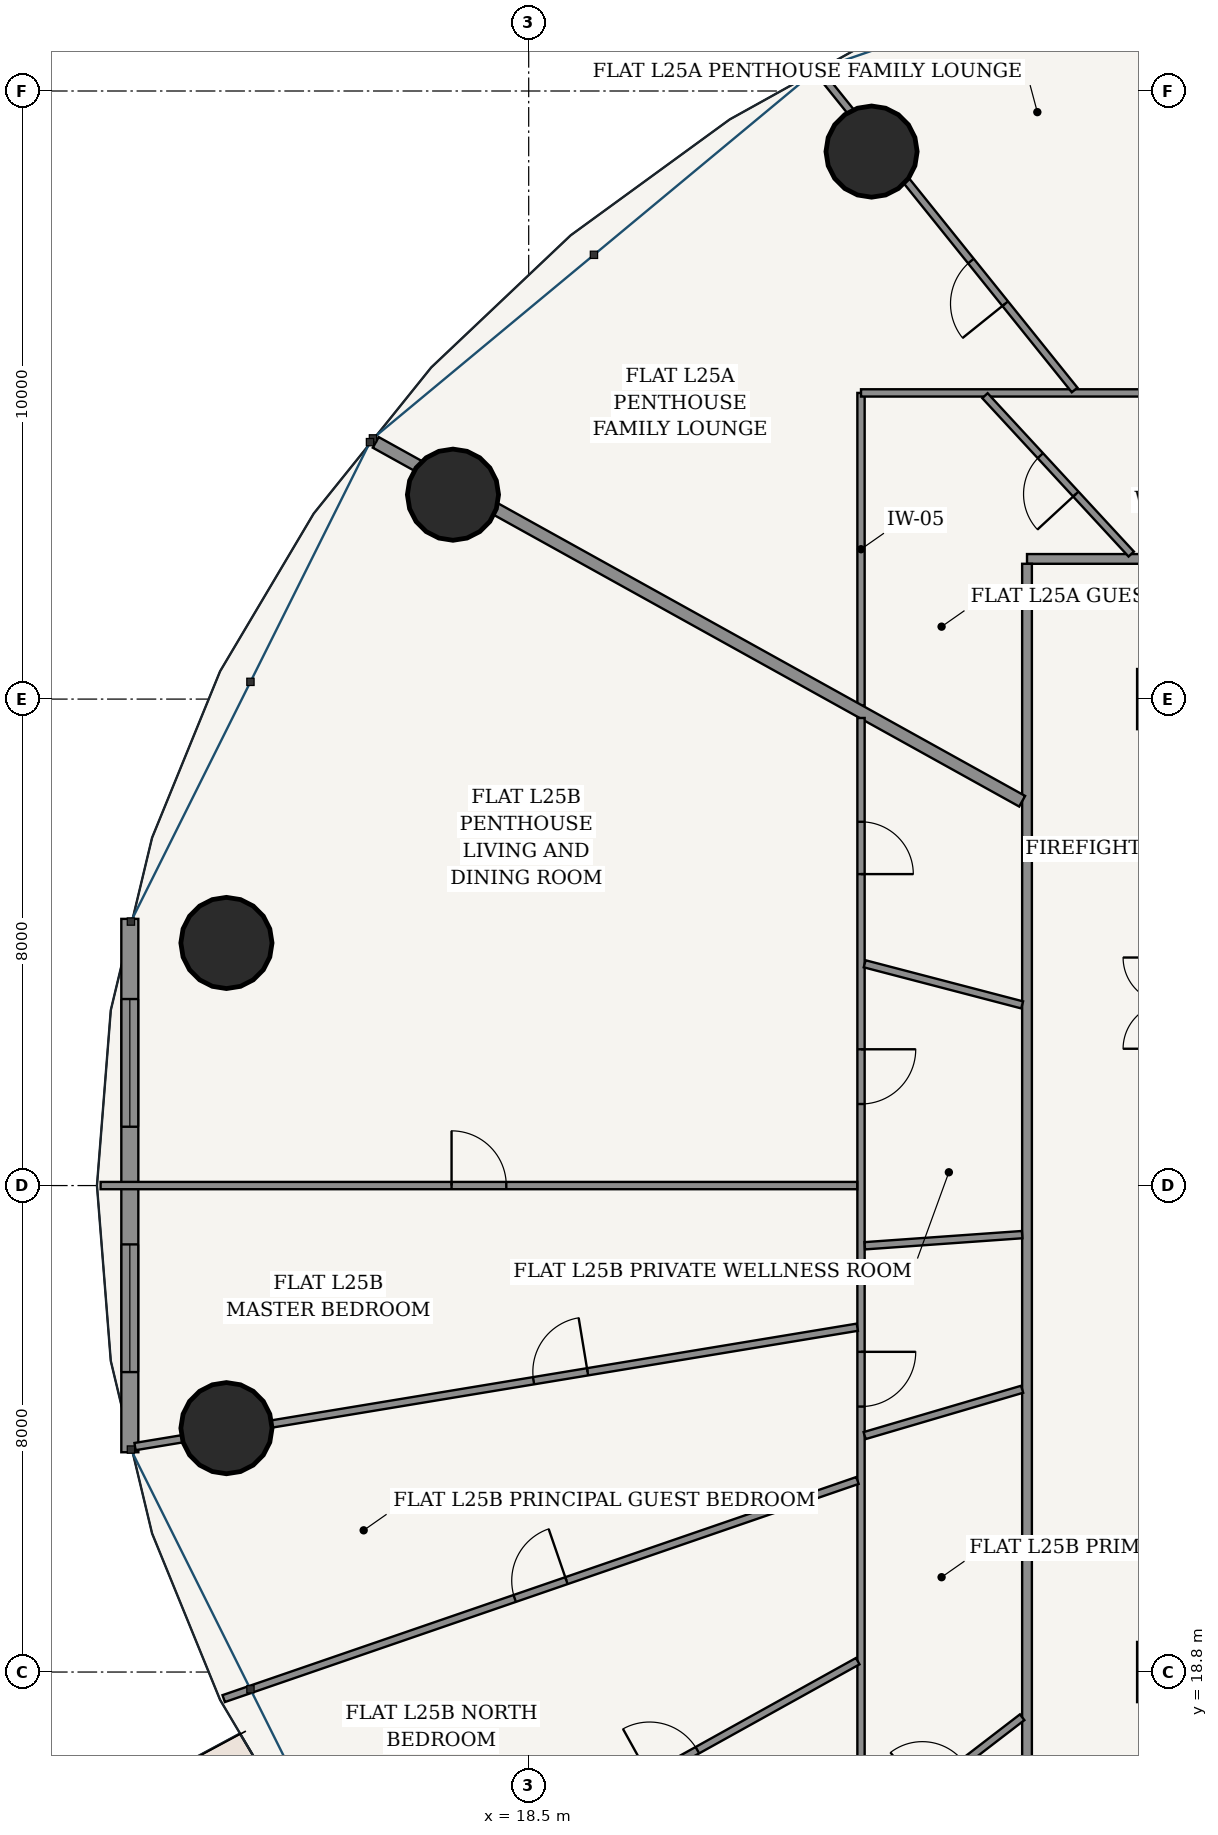
"""IFC4 building model, lengths in metres.
Left out: names, types, materials, properties, quantities, classifications, styles, units other than length and angle.
Written with IfcOpenShell. Run it as: python <this file> out.ifc"""

import sys

from ifc_helpers import new_model, si_unit, direction, frame, frame_2d, origin, origin_2d, place, context, subcontext, project, spatial, rectangle, hollow_circle, extrude, source, transform, mapped, element, fill, save


model = new_model("IFC4")
c1 = context("Model", 3, precision=1e-05, world=origin(), true_north=direction((-0.2419218956, 0.970295726276)))
c2 = subcontext(c1, "Body", "Model", "MODEL_VIEW")
j1 = project(units=[si_unit("LENGTHUNIT", "METRE"), si_unit("PLANEANGLEUNIT", "RADIAN")], contexts=[c1])
p1 = place(None, origin())
s1 = spatial("IfcSite", under=j1, at=p1, CompositionType="ELEMENT")
p2 = place(p1, origin())
s2 = spatial("IfcBuilding", under=s1, at=p2, CompositionType="ELEMENT")
p3 = place(p2, frame((0.0, 0.0, 97.8)))
s3 = spatial("IfcBuildingStorey", under=s2, at=p3, CompositionType="ELEMENT", Elevation=97.8)
for number, where, z_axis, x_axis in (
    (1, (24.138, 43.803, 0.0), (0.0, 0.0, 1.0), (1.0, 0.0, 0.0)),
    (2, (17.255, 38.161, 0.0), (0.0, 0.0, 1.0), (1.0, 0.0, 0.0)),
    (3, (13.529, 30.79, 0.0), (0.0, 0.0, 1.0), (1.0, 0.0, 0.0)),
    (4, (13.529, 22.81, 0.0), (0.0, 0.0, 1.0), (1.0, 0.0, 0.0)),
):
    element("IfcColumn", number, at=place(p3, frame(where, z_axis=z_axis, x_axis=x_axis)), inside=s3, PredefinedType="COLUMN", context=c2, shape_type="SweptSolid", body=[
        extrude(hollow_circle(Radius=0.75, WallThickness=0.045, at=origin_2d()), origin(), (0.0, 0.0, 1.0), 3.6),
    ])
p4 = place(p3, frame((11.94, 31.186, 0.0), z_axis=(0.0, 0.0, 1.0), x_axis=(0.0, -1.0, 0.0)))
e5 = element("IfcWall", 5, at=p4, inside=s3, PredefinedType="SOLIDWALL", context=c2, shape_type="SweptSolid", body=[
    extrude(rectangle(XDim=8.771, YDim=0.28, at=frame_2d((4.386, 0.0))), origin(), (0.0, 0.0, 1.0), 3.325),
])
p5 = place(p4, frame((1.318, 0.0, 0.85)))
e6 = element("IfcOpeningElement", 6, at=p5, cuts=e5, PredefinedType="OPENING", context=c2, shape_type="SweptSolid", body=[
    extrude(rectangle(XDim=2.1, YDim=1.95, at=frame_2d((1.05, 0.975))), frame((0.0, 0.15, 0.0), z_axis=(0.0, -1.0, 0.0), x_axis=(1.0, 0.0, 0.0)), (0.0, 0.0, 1.0), 0.3),
])
p6 = place(p4, frame((5.353, 0.0, 0.85)))
e7 = element("IfcOpeningElement", 7, at=p6, cuts=e5, PredefinedType="OPENING", context=c2, shape_type="SweptSolid", body=[
    extrude(rectangle(XDim=2.1, YDim=1.95, at=frame_2d((1.05, 0.975))), frame((0.0, 0.15, 0.0), z_axis=(0.0, -1.0, 0.0), x_axis=(1.0, 0.0, 0.0)), (0.0, 0.0, 1.0), 0.3),
])
p7 = place(p3, frame((26.695, 37.105, 0.0), z_axis=(0.0, 0.0, 1.0), x_axis=(1.0, 0.0, 0.0)))
e8 = element("IfcWall", 8, at=p7, inside=s3, PredefinedType="PARTITIONING", context=c2, shape_type="SweptSolid", body=[
    extrude(rectangle(XDim=22.61, YDim=0.16, at=frame_2d((11.305, 0.0))), origin(), (0.0, 0.0, 1.0), 2.767),
])
p8 = place(p7, frame((18.058, 0.0, 0.0)))
e9 = element("IfcOpeningElement", 9, at=p8, cuts=e8, PredefinedType="OPENING", context=c2, shape_type="SweptSolid", body=[
    extrude(rectangle(XDim=0.98, YDim=2.2, at=frame_2d((0.49, 1.1))), frame((0.0, 0.09, 0.0), z_axis=(0.0, -1.0, 0.0), x_axis=(1.0, 0.0, 0.0)), (0.0, 0.0, 1.0), 0.18),
])
p9 = place(p3, frame((26.695, 16.575, 0.0), z_axis=(0.0, 0.0, 1.0), x_axis=(0.0, 1.0, 0.0)))
e10 = element("IfcWall", 10, at=p9, inside=s3, PredefinedType="PARTITIONING", context=c2, shape_type="SweptSolid", body=[
    extrude(rectangle(XDim=20.45, YDim=0.16, at=frame_2d((10.225, 0.0))), origin(), (0.0, 0.0, 1.0), 2.767),
])
p10 = place(p3, frame((23.965, 34.693, 0.0), z_axis=(0.0, 0.0, 1.0), x_axis=(0.0, 1.0, 0.0)))
e11 = element("IfcWall", 11, at=p10, inside=s3, PredefinedType="PARTITIONING", context=c2, shape_type="SweptSolid", body=[
    extrude(rectangle(XDim=5.142, YDim=0.12, at=frame_2d((2.571, 0.0))), origin(), (0.0, 0.0, 1.0), 3.004),
])
p11 = place(p3, frame((23.965, 39.835, 0.0), z_axis=(0.0, 0.0, 1.0), x_axis=(1.0, 0.0, 0.0)))
e12 = element("IfcWall", 12, at=p11, inside=s3, PredefinedType="PARTITIONING", context=c2, shape_type="SweptSolid", body=[
    extrude(rectangle(XDim=28.07, YDim=0.12, at=frame_2d((14.035, 0.0))), origin(), (0.0, 0.0, 1.0), 2.767),
])
p12 = place(p11, frame((23.442, 0.0, 0.0)))
e13 = element("IfcOpeningElement", 13, at=p12, cuts=e12, PredefinedType="OPENING", context=c2, shape_type="SweptSolid", body=[
    extrude(rectangle(XDim=0.9, YDim=2.15, at=frame_2d((0.45, 1.075))), frame((0.0, 0.07, 0.0), z_axis=(0.0, -1.0, 0.0), x_axis=(1.0, 0.0, 0.0)), (0.0, 0.0, 1.0), 0.14),
])
p13 = place(p3, frame((31.474, 39.89, 0.0), z_axis=(0.0, 0.0, 1.0), x_axis=(-0.446167584581, 0.894949432353, 0.0)))
e14 = element("IfcWall", 14, at=p13, inside=s3, PredefinedType="PARTITIONING", context=c2, shape_type="SweptSolid", body=[
    extrude(rectangle(XDim=8.125, YDim=0.12, at=frame_2d((4.062, 0.0))), origin(), (0.0, 0.0, 1.0), 2.767),
])
p14 = place(p13, frame((3.612, 0.0, 0.0)))
e15 = element("IfcOpeningElement", 15, at=p14, cuts=e14, PredefinedType="OPENING", context=c2, shape_type="SweptSolid", body=[
    extrude(rectangle(XDim=0.9, YDim=2.15, at=frame_2d((0.45, 1.075))), frame((0.0, 0.07, 0.0), z_axis=(0.0, -1.0, 0.0), x_axis=(1.0, 0.0, 0.0)), (0.0, 0.0, 1.0), 0.14),
])
p15 = place(p3, frame((27.478, 39.883, 0.0), z_axis=(0.0, 0.0, 1.0), x_axis=(-0.62672583251, 0.779239841682, 0.0)))
e16 = element("IfcWall", 16, at=p15, inside=s3, PredefinedType="PARTITIONING", context=c2, shape_type="SweptSolid", body=[
    extrude(rectangle(XDim=6.678, YDim=0.12, at=frame_2d((3.339, 0.0))), origin(), (0.0, 0.0, 1.0), 2.767),
])
p16 = place(p15, frame((1.821, 0.0, 0.0)))
e17 = element("IfcOpeningElement", 17, at=p16, cuts=e16, PredefinedType="OPENING", context=c2, shape_type="SweptSolid", body=[
    extrude(rectangle(XDim=0.9, YDim=2.15, at=frame_2d((0.45, 1.075))), frame((0.0, 0.07, 0.0), z_axis=(0.0, -1.0, 0.0), x_axis=(1.0, 0.0, 0.0)), (0.0, 0.0, 1.0), 0.14),
])
p17 = place(p3, frame((28.409, 37.185, 0.0), z_axis=(0.0, 0.0, 1.0), x_axis=(-0.678451695105, 0.734645014554, 0.0)))
e18 = element("IfcWall", 18, at=p17, inside=s3, PredefinedType="PARTITIONING", context=c2, shape_type="SweptSolid", body=[
    extrude(rectangle(XDim=3.545, YDim=0.12, at=frame_2d((1.772, 0.0))), origin(), (0.0, 0.0, 1.0), 2.767),
])
p18 = place(p17, frame((1.343, 0.0, 0.0)))
e19 = element("IfcOpeningElement", 19, at=p18, cuts=e18, PredefinedType="OPENING", context=c2, shape_type="SweptSolid", body=[
    extrude(rectangle(XDim=0.86, YDim=2.15, at=frame_2d((0.43, 1.075))), frame((0.0, 0.07, 0.0), z_axis=(0.0, -1.0, 0.0), x_axis=(1.0, 0.0, 0.0)), (0.0, 0.0, 1.0), 0.14),
])
p19 = place(p3, frame((26.615, 33.12, 0.0), z_axis=(0.0, 0.0, 1.0), x_axis=(-0.874319192772, 0.485351366692, 0.0)))
e20 = element("IfcWall", 20, at=p19, inside=s3, PredefinedType="PARTITIONING", context=c2, shape_type="SweptSolid", body=[
    extrude(rectangle(XDim=12.158, YDim=0.2, at=frame_2d((6.079, 0.0))), origin(), (0.0, 0.0, 1.0), 2.767),
])
p20 = place(p3, frame((23.965, 13.765, 0.0), z_axis=(0.0, 0.0, 1.0), x_axis=(0.0, 1.0, 0.0)))
e21 = element("IfcWall", 21, at=p20, inside=s3, PredefinedType="PARTITIONING", context=c2, shape_type="SweptSolid", body=[
    extrude(rectangle(XDim=20.725, YDim=0.12, at=frame_2d((10.362, 0.0))), origin(), (0.0, 0.0, 1.0), 2.767),
])
p21 = place(p20, frame((9.401, 0.0, 0.0)))
e22 = element("IfcOpeningElement", 22, at=p21, cuts=e21, PredefinedType="OPENING", context=c2, shape_type="SweptSolid", body=[
    extrude(rectangle(XDim=0.9, YDim=2.15, at=frame_2d((0.45, 1.075))), frame((0.0, 0.07, 0.0), z_axis=(0.0, -1.0, 0.0), x_axis=(1.0, 0.0, 0.0)), (0.0, 0.0, 1.0), 0.14),
])
p22 = place(p20, frame((18.157, 0.0, 0.0)))
e23 = element("IfcOpeningElement", 23, at=p22, cuts=e21, PredefinedType="OPENING", context=c2, shape_type="SweptSolid", body=[
    extrude(rectangle(XDim=0.86, YDim=2.15, at=frame_2d((0.43, 1.075))), frame((0.0, 0.07, 0.0), z_axis=(0.0, -1.0, 0.0), x_axis=(1.0, 0.0, 0.0)), (0.0, 0.0, 1.0), 0.14),
])
p23 = place(p20, frame((14.376, 0.0, 0.0)))
e24 = element("IfcOpeningElement", 24, at=p23, cuts=e21, PredefinedType="OPENING", context=c2, shape_type="SweptSolid", body=[
    extrude(rectangle(XDim=0.9, YDim=2.15, at=frame_2d((0.45, 1.075))), frame((0.0, 0.07, 0.0), z_axis=(0.0, -1.0, 0.0), x_axis=(1.0, 0.0, 0.0)), (0.0, 0.0, 1.0), 0.14),
])
p24 = place(p3, frame((23.903, 26.8, 0.0), z_axis=(0.0, 0.0, 1.0), x_axis=(-1.0, 0.0, 0.0)))
e25 = element("IfcWall", 25, at=p24, inside=s3, PredefinedType="PARTITIONING", context=c2, shape_type="SweptSolid", body=[
    extrude(rectangle(XDim=12.443, YDim=0.12, at=frame_2d((6.222, 0.0))), origin(), (0.0, 0.0, 1.0), 2.767),
])
p25 = place(p24, frame((5.771, 0.0, 0.0)))
e26 = element("IfcOpeningElement", 26, at=p25, cuts=e25, PredefinedType="OPENING", context=c2, shape_type="SweptSolid", body=[
    extrude(rectangle(XDim=0.9, YDim=2.15, at=frame_2d((0.45, 1.075))), frame((0.0, 0.07, 0.0), z_axis=(0.0, -1.0, 0.0), x_axis=(1.0, 0.0, 0.0)), (0.0, 0.0, 1.0), 0.14),
])
p26 = place(p3, frame((23.904, 24.47, 0.0), z_axis=(0.0, 0.0, 1.0), x_axis=(-0.986618264768, -0.163047231274, 0.0)))
e27 = element("IfcWall", 27, at=p26, inside=s3, PredefinedType="PARTITIONING", context=c2, shape_type="SweptSolid", body=[
    extrude(rectangle(XDim=12.039, YDim=0.12, at=frame_2d((6.02, 0.0))), origin(), (0.0, 0.0, 1.0), 2.767),
])
p27 = place(p26, frame((4.496, 0.0, 0.0)))
e28 = element("IfcOpeningElement", 28, at=p27, cuts=e27, PredefinedType="OPENING", context=c2, shape_type="SweptSolid", body=[
    extrude(rectangle(XDim=0.9, YDim=2.15, at=frame_2d((0.45, 1.075))), frame((0.0, 0.07, 0.0), z_axis=(0.0, -1.0, 0.0), x_axis=(1.0, 0.0, 0.0)), (0.0, 0.0, 1.0), 0.14),
])
p28 = place(p3, frame((23.906, 21.95, 0.0), z_axis=(0.0, 0.0, 1.0), x_axis=(-0.945573120726, -0.32540970078, 0.0)))
e29 = element("IfcWall", 29, at=p28, inside=s3, PredefinedType="PARTITIONING", context=c2, shape_type="SweptSolid", body=[
    extrude(rectangle(XDim=11.022, YDim=0.12, at=frame_2d((5.511, 0.0))), origin(), (0.0, 0.0, 1.0), 2.767),
])
p29 = place(p28, frame((5.061, 0.0, 0.0)))
e30 = element("IfcOpeningElement", 30, at=p29, cuts=e29, PredefinedType="OPENING", context=c2, shape_type="SweptSolid", body=[
    extrude(rectangle(XDim=0.9, YDim=2.15, at=frame_2d((0.45, 1.075))), frame((0.0, 0.07, 0.0), z_axis=(0.0, -1.0, 0.0), x_axis=(1.0, 0.0, 0.0)), (0.0, 0.0, 1.0), 0.14),
])
p30 = place(p3, frame((23.911, 18.979, 0.0), z_axis=(0.0, 0.0, 1.0), x_axis=(-0.874313476423, -0.485361664066, 0.0)))
e31 = element("IfcWall", 31, at=p30, inside=s3, PredefinedType="PARTITIONING", context=c2, shape_type="SweptSolid", body=[
    extrude(rectangle(XDim=9.066, YDim=0.12, at=frame_2d((4.533, 0.0))), origin(), (0.0, 0.0, 1.0), 2.767),
])
p31 = place(p30, frame((3.016, 0.0, 0.0)))
e32 = element("IfcOpeningElement", 32, at=p31, cuts=e31, PredefinedType="OPENING", context=c2, shape_type="SweptSolid", body=[
    extrude(rectangle(XDim=0.9, YDim=2.15, at=frame_2d((0.45, 1.075))), frame((0.0, 0.07, 0.0), z_axis=(0.0, -1.0, 0.0), x_axis=(1.0, 0.0, 0.0)), (0.0, 0.0, 1.0), 0.14),
])
p32 = place(p3, frame((26.615, 29.771, 0.0), z_axis=(0.0, 0.0, 1.0), x_axis=(-0.967585302816, 0.252544415449, 0.0)))
e33 = element("IfcWall", 33, at=p32, inside=s3, PredefinedType="PARTITIONING", context=c2, shape_type="SweptSolid", body=[
    extrude(rectangle(XDim=2.677, YDim=0.12, at=frame_2d((1.338, 0.0))), origin(), (0.0, 0.0, 1.0), 3.325),
])
p33 = place(p3, frame((26.615, 25.993, 0.0), z_axis=(0.0, 0.0, 1.0), x_axis=(-0.997500084777, -0.070665273433, 0.0)))
e34 = element("IfcWall", 34, at=p33, inside=s3, PredefinedType="PARTITIONING", context=c2, shape_type="SweptSolid", body=[
    extrude(rectangle(XDim=2.595, YDim=0.12, at=frame_2d((1.297, 0.0))), origin(), (0.0, 0.0, 1.0), 3.325),
])
p34 = place(p3, frame((26.615, 23.45, 0.0), z_axis=(0.0, 0.0, 1.0), x_axis=(-0.959338143787, -0.282259323806, 0.0)))
e35 = element("IfcWall", 35, at=p34, inside=s3, PredefinedType="PARTITIONING", context=c2, shape_type="SweptSolid", body=[
    extrude(rectangle(XDim=2.7, YDim=0.12, at=frame_2d((1.35, 0.0))), origin(), (0.0, 0.0, 1.0), 3.325),
])
p35 = place(p3, frame((26.615, 18.056, 0.0), z_axis=(0.0, 0.0, 1.0), x_axis=(-0.79311360735, -0.609073727751, 0.0)))
e36 = element("IfcWall", 36, at=p35, inside=s3, PredefinedType="PARTITIONING", context=c2, shape_type="SweptSolid", body=[
    extrude(rectangle(XDim=3.279, YDim=0.12, at=frame_2d((1.64, 0.0))), origin(), (0.0, 0.0, 1.0), 3.004),
])
p36 = place(p35, frame((1.21, 0.0, 0.0)))
e37 = element("IfcOpeningElement", 37, at=p36, cuts=e36, PredefinedType="OPENING", context=c2, shape_type="SweptSolid", body=[
    extrude(rectangle(XDim=0.86, YDim=2.15, at=frame_2d((0.43, 1.075))), frame((0.0, 0.07, 0.0), z_axis=(0.0, -1.0, 0.0), x_axis=(1.0, 0.0, 0.0)), (0.0, 0.0, 1.0), 0.14),
])
m1 = source(origin(), c2, "Body", "SweptSolid", [
    extrude(rectangle(XDim=2.1, YDim=1.95, at=frame_2d((1.05, 0.975))), frame((0.0, 0.03, 0.0), z_axis=(0.0, -1.0, 0.0), x_axis=(1.0, 0.0, 0.0)), (0.0, 0.0, 1.0), 0.06),
])
p37 = place(p5, origin())
e38 = element("IfcWindow", 38, at=p37, inside=s3, PartitioningType="SINGLE_PANEL", PredefinedType="WINDOW", context=c2, shape_type="MappedRepresentation", body=[
    mapped(m1, transform((0.0, 0.0, 0.0), scale=1.0)),
])
fill(e6, e38)
p38 = place(p6, origin())
e39 = element("IfcWindow", 39, at=p38, inside=s3, PartitioningType="SINGLE_PANEL", PredefinedType="WINDOW", context=c2, shape_type="MappedRepresentation", body=[
    mapped(m1, transform((0.0, 0.0, 0.0), scale=1.0)),
])
fill(e7, e39)
m2 = source(origin(), c2, "Body", "SweptSolid", [
    extrude(rectangle(XDim=0.86, YDim=2.15, at=frame_2d((0.43, 1.075))), frame((0.0, 0.025, 0.0), z_axis=(0.0, -1.0, 0.0), x_axis=(1.0, 0.0, 0.0)), (0.0, 0.0, 1.0), 0.05),
])
p39 = place(p18, origin())
e40 = element("IfcDoor", 40, at=p39, inside=s3, OperationType="SINGLE_SWING_LEFT", PredefinedType="DOOR", context=c2, shape_type="MappedRepresentation", body=[
    mapped(m2, transform((0.0, 0.0, 0.0), scale=1.0)),
])
fill(e19, e40)
m3 = source(origin(), c2, "Body", "SweptSolid", [
    extrude(rectangle(XDim=0.9, YDim=2.15, at=frame_2d((0.45, 1.075))), frame((0.0, 0.025, 0.0), z_axis=(0.0, -1.0, 0.0), x_axis=(1.0, 0.0, 0.0)), (0.0, 0.0, 1.0), 0.05),
])
p40 = place(p16, origin())
e41 = element("IfcDoor", 41, at=p40, inside=s3, OperationType="SINGLE_SWING_LEFT", PredefinedType="DOOR", context=c2, shape_type="MappedRepresentation", body=[
    mapped(m3, transform((0.0, 0.0, 0.0), scale=1.0)),
])
fill(e17, e41)
p41 = place(p31, frame((0.9, 0.0, 0.0), z_axis=(0.0, 0.0, 1.0), x_axis=(-1.0, 0.0, 0.0)))
e42 = element("IfcDoor", 42, at=p41, inside=s3, OperationType="SINGLE_SWING_LEFT", PredefinedType="DOOR", context=c2, shape_type="MappedRepresentation", body=[
    mapped(m3, transform((0.0, 0.0, 0.0), scale=1.0)),
])
fill(e32, e42)
p42 = place(p29, frame((0.9, 0.0, 0.0), z_axis=(0.0, 0.0, 1.0), x_axis=(-1.0, 0.0, 0.0)))
e43 = element("IfcDoor", 43, at=p42, inside=s3, OperationType="SINGLE_SWING_RIGHT", PredefinedType="DOOR", context=c2, shape_type="MappedRepresentation", body=[
    mapped(m3, transform((0.0, 0.0, 0.0), scale=1.0)),
])
fill(e30, e43)
p43 = place(p21, frame((0.9, 0.0, 0.0), z_axis=(0.0, 0.0, 1.0), x_axis=(-1.0, 0.0, 0.0)))
e44 = element("IfcDoor", 44, at=p43, inside=s3, OperationType="SINGLE_SWING_LEFT", PredefinedType="DOOR", context=c2, shape_type="MappedRepresentation", body=[
    mapped(m3, transform((0.0, 0.0, 0.0), scale=1.0)),
])
fill(e22, e44)
p44 = place(p27, frame((0.9, 0.0, 0.0), z_axis=(0.0, 0.0, 1.0), x_axis=(-1.0, 0.0, 0.0)))
e45 = element("IfcDoor", 45, at=p44, inside=s3, OperationType="SINGLE_SWING_RIGHT", PredefinedType="DOOR", context=c2, shape_type="MappedRepresentation", body=[
    mapped(m3, transform((0.0, 0.0, 0.0), scale=1.0)),
])
fill(e28, e45)
p45 = place(p25, frame((0.9, 0.0, 0.0), z_axis=(0.0, 0.0, 1.0), x_axis=(-1.0, 0.0, 0.0)))
e46 = element("IfcDoor", 46, at=p45, inside=s3, OperationType="SINGLE_SWING_LEFT", PredefinedType="DOOR", context=c2, shape_type="MappedRepresentation", body=[
    mapped(m3, transform((0.0, 0.0, 0.0), scale=1.0)),
])
fill(e26, e46)
p46 = place(p22, frame((0.86, 0.0, 0.0), z_axis=(0.0, 0.0, 1.0), x_axis=(-1.0, 0.0, 0.0)))
e47 = element("IfcDoor", 47, at=p46, inside=s3, OperationType="SINGLE_SWING_RIGHT", PredefinedType="DOOR", context=c2, shape_type="MappedRepresentation", body=[
    mapped(m2, transform((0.0, 0.0, 0.0), scale=1.0)),
])
fill(e23, e47)
p47 = place(p23, frame((0.9, 0.0, 0.0), z_axis=(0.0, 0.0, 1.0), x_axis=(-1.0, 0.0, 0.0)))
e48 = element("IfcDoor", 48, at=p47, inside=s3, OperationType="SINGLE_SWING_LEFT", PredefinedType="DOOR", context=c2, shape_type="MappedRepresentation", body=[
    mapped(m3, transform((0.0, 0.0, 0.0), scale=1.0)),
])
fill(e24, e48)
save(model, sys.argv[1])
